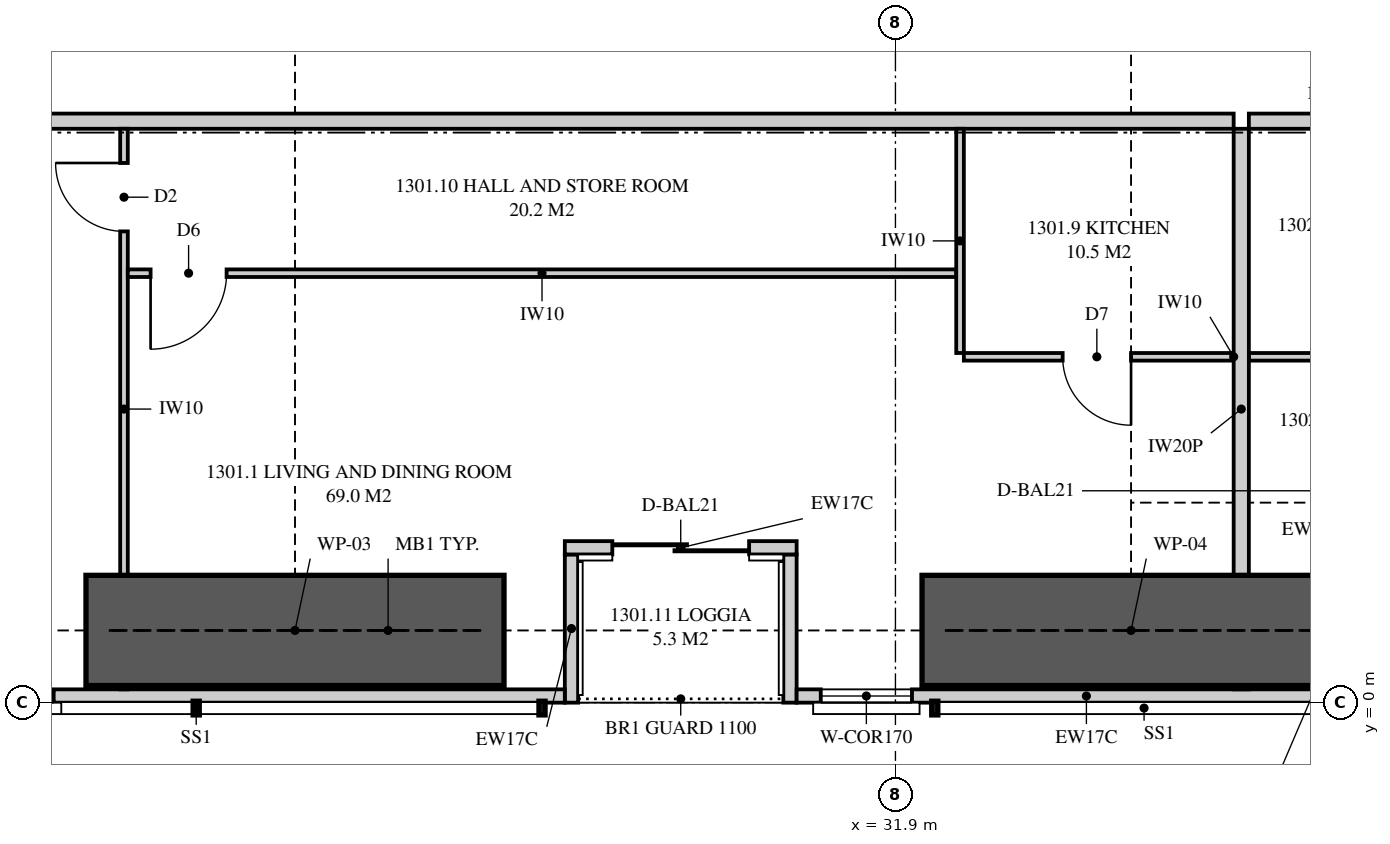
"""IFC4 building model, lengths in metres.
Left out: names, types, materials, properties, quantities, classifications, styles, units other than length and angle.
Written with IfcOpenShell. Run it as: python <this file> out.ifc"""

import sys

from ifc_helpers import new_model, si_unit, direction, frame, frame_2d, origin, place, context, subcontext, project, spatial, polyline, rectangle, outline, extrude, element, fill, save


model = new_model("IFC4")
c1 = context("Model", 3, precision=1e-05, world=origin(), true_north=direction((0.0, 1.0)))
c2 = subcontext(c1, "Body", "Model", "MODEL_VIEW")
j1 = project(units=[si_unit("LENGTHUNIT", "METRE"), si_unit("PLANEANGLEUNIT", "RADIAN")], contexts=[c1])
p1 = place(None, origin())
s1 = spatial("IfcSite", under=j1, at=p1, CompositionType="ELEMENT")
p2 = place(p1, origin())
s2 = spatial("IfcBuilding", under=s1, at=p2, CompositionType="ELEMENT")
p3 = place(p2, frame((0.0, 0.0, 51.15)))
s3 = spatial("IfcBuildingStorey", under=s2, at=p3, CompositionType="ELEMENT", Elevation=51.15)
p4 = place(p3, frame((5.051, 0.087, 0.0), z_axis=(0.0, 0.0, 1.0), x_axis=(1.0, 0.0, 0.0)))
e1 = element("IfcWall", 1, at=p4, inside=s3, PredefinedType="SOLIDWALL", context=c2, shape_type="SweptSolid", body=[
    extrude(outline(polyline([(0.0, 0.0), (22.499, 0.0), (22.499, 2.15), (7.949, 2.15), (7.949, 3.11), (7.793, 3.11), (7.793, 2.15), (7.745, 2.15), (7.745, 3.11), (0.0, 3.11), (0.0, 0.0)])), frame((0.0, 0.087, 0.0), z_axis=(0.0, -1.0, 0.0), x_axis=(1.0, 0.0, 0.0)), (0.0, 0.0, 1.0), 0.175),
])
p5 = place(p4, frame((3.234, 0.0, 0.4)))
e2 = element("IfcOpeningElement", 2, at=p5, cuts=e1, PredefinedType="OPENING", context=c2, shape_type="SweptSolid", body=[
    extrude(rectangle(XDim=1.8, YDim=1.7, at=frame_2d((0.9, 0.85))), frame((0.0, 0.097, 0.0), z_axis=(0.0, -1.0, 0.0), x_axis=(1.0, 0.0, 0.0)), (0.0, 0.0, 1.0), 0.195),
])
p6 = place(p4, frame((10.806, 0.0, 0.4)))
e3 = element("IfcOpeningElement", 3, at=p6, cuts=e1, PredefinedType="OPENING", context=c2, shape_type="SweptSolid", body=[
    extrude(rectangle(XDim=1.8, YDim=1.7, at=frame_2d((0.9, 0.85))), frame((0.0, 0.097, 0.0), z_axis=(0.0, -1.0, 0.0), x_axis=(1.0, 0.0, 0.0)), (0.0, 0.0, 1.0), 0.195),
])
p7 = place(p4, frame((13.974, 0.0, 0.4)))
e4 = element("IfcOpeningElement", 4, at=p7, cuts=e1, PredefinedType="OPENING", context=c2, shape_type="SweptSolid", body=[
    extrude(rectangle(XDim=1.8, YDim=1.7, at=frame_2d((0.9, 0.85))), frame((0.0, 0.097, 0.0), z_axis=(0.0, -1.0, 0.0), x_axis=(1.0, 0.0, 0.0)), (0.0, 0.0, 1.0), 0.195),
])
p8 = place(p3, frame((30.6, 0.087, 0.0), z_axis=(0.0, 0.0, 1.0), x_axis=(1.0, 0.0, 0.0)))
e5 = element("IfcWall", 5, at=p8, inside=s3, PredefinedType="SOLIDWALL", context=c2, shape_type="SweptSolid", body=[
    extrude(outline(polyline([(0.0, 0.0), (7.625, 0.0), (7.625, 3.11), (4.604, 3.11), (4.604, 2.15), (4.556, 2.15), (4.556, 3.11), (4.4, 3.11), (4.4, 2.15), (0.0, 2.15), (0.0, 0.0)])), frame((0.0, 0.087, 0.0), z_axis=(0.0, -1.0, 0.0), x_axis=(1.0, 0.0, 0.0)), (0.0, 0.0, 1.0), 0.175),
])
p9 = place(p8, frame((0.317, 0.0, 0.4)))
e6 = element("IfcOpeningElement", 6, at=p9, cuts=e5, PredefinedType="OPENING", context=c2, shape_type="SweptSolid", body=[
    extrude(rectangle(XDim=1.2, YDim=1.7, at=frame_2d((0.6, 0.85))), frame((0.0, 0.097, 0.0), z_axis=(0.0, -1.0, 0.0), x_axis=(1.0, 0.0, 0.0)), (0.0, 0.0, 1.0), 0.195),
])
p10 = place(p3, frame((27.55, 2.038, 0.0), z_axis=(0.0, 0.0, 1.0), x_axis=(1.0, 0.0, 0.0)))
e7 = element("IfcWall", 7, at=p10, inside=s3, PredefinedType="SOLIDWALL", context=c2, shape_type="SweptSolid", body=[
    extrude(rectangle(XDim=3.05, YDim=0.175, at=frame_2d((1.525, 0.0))), origin(), (0.0, 0.0, 1.0), 3.11),
])
p11 = place(p10, frame((0.625, 0.0, 0.0)))
e8 = element("IfcOpeningElement", 8, at=p11, cuts=e7, PredefinedType="OPENING", context=c2, shape_type="SweptSolid", body=[
    extrude(rectangle(XDim=1.8, YDim=2.1, at=frame_2d((0.9, 1.05))), frame((0.0, 0.097, 0.0), z_axis=(0.0, -1.0, 0.0), x_axis=(1.0, 0.0, 0.0)), (0.0, 0.0, 1.0), 0.195),
])
for number, where, z_axis, x_axis in (
    (9, (27.637, 0.0, 0.0), (0.0, 0.0, 1.0), (0.0, 1.0, 0.0)),
    (10, (30.512, 0.0, 0.0), (0.0, 0.0, 1.0), (0.0, 1.0, 0.0)),
):
    element("IfcWall", number, at=place(p3, frame(where, z_axis=z_axis, x_axis=x_axis)), inside=s3, PredefinedType="SOLIDWALL", context=c2, shape_type="SweptSolid", body=[
        extrude(outline(polyline([(0.0, 0.0), (1.95, 0.0), (1.95, 3.11), (1.75, 3.11), (1.75, 2.15), (0.15, 2.15), (0.15, 3.11), (0.0, 3.11), (0.0, 0.0)])), frame((0.0, 0.087, 0.0), z_axis=(0.0, -1.0, 0.0), x_axis=(1.0, 0.0, 0.0)), (0.0, 0.0, 1.0), 0.175),
    ])
p12 = place(p3, frame((36.45, 0.175, 0.0), z_axis=(0.0, 0.0, 1.0), x_axis=(0.0, 1.0, 0.0)))
e11 = element("IfcWall", 11, at=p12, inside=s3, PredefinedType="PARTITIONING", context=c2, shape_type="SweptSolid", body=[
    extrude(outline(polyline([(0.138, 3.11), (0.0, 3.11), (0.0, 0.0), (0.529, 0.0), (0.529, 0.513), (1.021, 0.513), (1.021, 0.0), (7.375, 0.0), (7.375, 3.11), (3.766, 3.11), (3.766, 2.51), (1.994, 2.51), (1.994, 2.15), (1.021, 2.15), (1.021, 1.637), (0.529, 1.637), (0.529, 2.15), (0.138, 2.15), (0.138, 3.11)])), frame((0.0, 0.1, 0.0), z_axis=(0.0, -1.0, 0.0), x_axis=(1.0, 0.0, 0.0)), (0.0, 0.0, 1.0), 0.2),
])
p13 = place(p3, frame((17.725, 7.65, 0.0), z_axis=(0.0, 0.0, 1.0), x_axis=(1.0, 0.0, 0.0)))
e12 = element("IfcWall", 12, at=p13, inside=s3, PredefinedType="PARTITIONING", context=c2, shape_type="SweptSolid", body=[
    extrude(outline(polyline([(0.0, 0.0), (18.625, 0.0), (18.625, 3.11), (17.612, 3.11), (17.612, 2.541), (16.938, 2.541), (16.938, 3.11), (6.612, 3.11), (6.612, 2.541), (5.938, 2.541), (5.938, 3.11), (0.0, 3.11), (0.0, 0.0)])), frame((0.0, 0.1, 0.0), z_axis=(0.0, -1.0, 0.0), x_axis=(1.0, 0.0, 0.0)), (0.0, 0.0, 1.0), 0.2),
])
p14 = place(p13, frame((1.0, 0.0, 0.0)))
e13 = element("IfcOpeningElement", 13, at=p14, cuts=e12, PredefinedType="OPENING", context=c2, shape_type="SweptSolid", body=[
    extrude(rectangle(XDim=1.05, YDim=2.2, at=frame_2d((0.525, 1.1))), frame((0.0, 0.11, 0.0), z_axis=(0.0, -1.0, 0.0), x_axis=(1.0, 0.0, 0.0)), (0.0, 0.0, 1.0), 0.22),
])
p15 = place(p3, frame((21.75, 0.175, 0.0), z_axis=(0.0, 0.0, 1.0), x_axis=(0.0, 1.0, 0.0)))
e14 = element("IfcWall", 14, at=p15, inside=s3, PredefinedType="PARTITIONING", context=c2, shape_type="SweptSolid", body=[
    extrude(outline(polyline([(0.0, 0.0), (7.375, 0.0), (7.375, 3.11), (1.635, 3.11), (1.635, 2.15), (0.0, 2.15), (0.0, 3.11), (0.0, 0.0)])), frame((0.0, 0.05, 0.0), z_axis=(0.0, -1.0, 0.0), x_axis=(1.0, 0.0, 0.0)), (0.0, 0.0, 1.0), 0.1),
])
p16 = place(p15, frame((6.025, 0.0, 0.0)))
e15 = element("IfcOpeningElement", 15, at=p16, cuts=e14, PredefinedType="OPENING", context=c2, shape_type="SweptSolid", body=[
    extrude(rectangle(XDim=0.9, YDim=2.1, at=frame_2d((0.45, 1.05))), frame((0.0, 0.06, 0.0), z_axis=(0.0, -1.0, 0.0), x_axis=(1.0, 0.0, 0.0)), (0.0, 0.0, 1.0), 0.12),
])
p17 = place(p3, frame((32.8, 4.55, 0.0), z_axis=(0.0, 0.0, 1.0), x_axis=(1.0, 0.0, 0.0)))
e16 = element("IfcWall", 16, at=p17, inside=s3, PredefinedType="PARTITIONING", context=c2, shape_type="SweptSolid", body=[
    extrude(outline(polyline([(0.0, 0.0), (3.55, 0.0), (3.55, 3.11), (2.487, 3.11), (2.487, 2.541), (1.913, 2.541), (1.913, 3.11), (0.0, 3.11), (0.0, 0.0)])), frame((0.0, 0.05, 0.0), z_axis=(0.0, -1.0, 0.0), x_axis=(1.0, 0.0, 0.0)), (0.0, 0.0, 1.0), 0.1),
])
p18 = place(p17, frame((1.3, 0.0, 0.0)))
e17 = element("IfcOpeningElement", 17, at=p18, cuts=e16, PredefinedType="OPENING", context=c2, shape_type="SweptSolid", body=[
    extrude(rectangle(XDim=0.9, YDim=2.1, at=frame_2d((0.45, 1.05))), frame((0.0, 0.06, 0.0), z_axis=(0.0, -1.0, 0.0), x_axis=(1.0, 0.0, 0.0)), (0.0, 0.0, 1.0), 0.12),
])
p19 = place(p3, frame((32.75, 4.6, 0.0), z_axis=(0.0, 0.0, 1.0), x_axis=(0.0, 1.0, 0.0)))
e18 = element("IfcWall", 18, at=p19, inside=s3, PredefinedType="PARTITIONING", context=c2, shape_type="SweptSolid", body=[
    extrude(rectangle(XDim=2.95, YDim=0.1, at=frame_2d((1.475, 0.0))), origin(), (0.0, 0.0, 1.0), 3.11),
])
p20 = place(p3, frame((21.8, 5.65, 0.0), z_axis=(0.0, 0.0, 1.0), x_axis=(1.0, 0.0, 0.0)))
e19 = element("IfcWall", 19, at=p20, inside=s3, PredefinedType="PARTITIONING", context=c2, shape_type="SweptSolid", body=[
    extrude(outline(polyline([(0.0, 0.0), (10.9, 0.0), (10.9, 3.11), (2.487, 3.11), (2.487, 2.541), (1.913, 2.541), (1.913, 3.11), (0.0, 3.11), (0.0, 0.0)])), frame((0.0, 0.05, 0.0), z_axis=(0.0, -1.0, 0.0), x_axis=(1.0, 0.0, 0.0)), (0.0, 0.0, 1.0), 0.1),
])
p21 = place(p20, frame((0.3, 0.0, 0.0)))
e20 = element("IfcOpeningElement", 20, at=p21, cuts=e19, PredefinedType="OPENING", context=c2, shape_type="SweptSolid", body=[
    extrude(rectangle(XDim=1.0, YDim=2.1, at=frame_2d((0.5, 1.05))), frame((0.0, 0.06, 0.0), z_axis=(0.0, -1.0, 0.0), x_axis=(1.0, 0.0, 0.0)), (0.0, 0.0, 1.0), 0.12),
])
p22 = place(p3, frame((36.55, 7.65, 0.0), z_axis=(0.0, 0.0, 1.0), x_axis=(1.0, 0.0, 0.0)))
e21 = element("IfcWall", 21, at=p22, inside=s3, PredefinedType="PARTITIONING", context=c2, shape_type="SweptSolid", body=[
    extrude(outline(polyline([(0.0, 0.0), (9.45, 0.0), (9.45, 3.11), (8.554, 3.11), (8.554, 2.15), (6.71, 2.15), (6.71, 3.11), (0.0, 3.11), (0.0, 0.0)])), frame((0.0, 0.1, 0.0), z_axis=(0.0, -1.0, 0.0), x_axis=(1.0, 0.0, 0.0)), (0.0, 0.0, 1.0), 0.2),
])
p23 = place(p22, frame((1.45, 0.0, 0.0)))
e22 = element("IfcOpeningElement", 22, at=p23, cuts=e21, PredefinedType="OPENING", context=c2, shape_type="SweptSolid", body=[
    extrude(rectangle(XDim=1.05, YDim=2.2, at=frame_2d((0.525, 1.1))), frame((0.0, 0.11, 0.0), z_axis=(0.0, -1.0, 0.0), x_axis=(1.0, 0.0, 0.0)), (0.0, 0.0, 1.0), 0.22),
])
p24 = place(p3, frame((36.55, 4.55, 0.0), z_axis=(0.0, 0.0, 1.0), x_axis=(1.0, 0.0, 0.0)))
e23 = element("IfcWall", 23, at=p24, inside=s3, PredefinedType="PARTITIONING", context=c2, shape_type="SweptSolid", body=[
    extrude(rectangle(XDim=3.55, YDim=0.1, at=frame_2d((1.775, 0.0))), origin(), (0.0, 0.0, 1.0), 3.11),
])
p25 = place(p24, frame((1.35, 0.0, 0.0)))
e24 = element("IfcOpeningElement", 24, at=p25, cuts=e23, PredefinedType="OPENING", context=c2, shape_type="SweptSolid", body=[
    extrude(rectangle(XDim=0.9, YDim=2.1, at=frame_2d((0.45, 1.05))), frame((0.0, 0.06, 0.0), z_axis=(0.0, -1.0, 0.0), x_axis=(1.0, 0.0, 0.0)), (0.0, 0.0, 1.0), 0.12),
])
for number, where, z_axis, x_axis in (
    (25, (21.25, 0.95, 0.0), (0.0, 0.0, 1.0), (1.0, 0.0, 0.0)),
    (26, (32.25, 0.95, 0.0), (0.0, 0.0, 1.0), (1.0, 0.0, 0.0)),
):
    element("IfcWall", number, at=place(p3, frame(where, z_axis=z_axis, x_axis=x_axis)), inside=s3, PredefinedType="SHEAR", context=c2, shape_type="SweptSolid", body=[
        extrude(rectangle(XDim=5.5, YDim=1.45, at=frame_2d((2.75, 0.0))), origin(), (0.0, 0.0, 1.0), 3.35),
    ])
p26 = place(p7, origin())
e27 = element("IfcWindow", 27, at=p26, inside=s3, PartitioningType="SINGLE_PANEL", PredefinedType="WINDOW", context=c2, shape_type="SweptSolid", body=[
    extrude(rectangle(XDim=1.8, YDim=1.7, at=frame_2d((0.9, 0.85))), frame((0.0, 0.03, 0.0), z_axis=(0.0, -1.0, 0.0), x_axis=(1.0, 0.0, 0.0)), (0.0, 0.0, 1.0), 0.06),
])
fill(e4, e27)
p27 = place(p11, origin())
e28 = element("IfcDoor", 28, at=p27, inside=s3, OperationType="SLIDING_TO_LEFT", PredefinedType="DOOR", context=c2, shape_type="SweptSolid", body=[
    extrude(rectangle(XDim=1.8, YDim=2.1, at=frame_2d((0.9, 1.05))), frame((0.0, 0.025, 0.0), z_axis=(0.0, -1.0, 0.0), x_axis=(1.0, 0.0, 0.0)), (0.0, 0.0, 1.0), 0.05),
])
fill(e8, e28)
p28 = place(p9, origin())
e29 = element("IfcWindow", 29, at=p28, inside=s3, PartitioningType="SINGLE_PANEL", PredefinedType="WINDOW", context=c2, shape_type="SweptSolid", body=[
    extrude(rectangle(XDim=1.2, YDim=1.7, at=frame_2d((0.6, 0.85))), frame((0.0, 0.03, 0.0), z_axis=(0.0, -1.0, 0.0), x_axis=(1.0, 0.0, 0.0)), (0.0, 0.0, 1.0), 0.06),
])
fill(e6, e29)
p29 = place(p16, origin())
e30 = element("IfcDoor", 30, at=p29, inside=s3, OperationType="SINGLE_SWING_RIGHT", PredefinedType="DOOR", context=c2, shape_type="SweptSolid", body=[
    extrude(rectangle(XDim=0.9, YDim=2.1, at=frame_2d((0.45, 1.05))), frame((0.0, 0.025, 0.0), z_axis=(0.0, -1.0, 0.0), x_axis=(1.0, 0.0, 0.0)), (0.0, 0.0, 1.0), 0.05),
])
fill(e15, e30)
p30 = place(p18, frame((0.9, 0.0, 0.0), z_axis=(0.0, 0.0, 1.0), x_axis=(-1.0, 0.0, 0.0)))
e31 = element("IfcDoor", 31, at=p30, inside=s3, OperationType="SINGLE_SWING_LEFT", PredefinedType="DOOR", context=c2, shape_type="SweptSolid", body=[
    extrude(rectangle(XDim=0.9, YDim=2.1, at=frame_2d((0.45, 1.05))), frame((0.0, 0.025, 0.0), z_axis=(0.0, -1.0, 0.0), x_axis=(1.0, 0.0, 0.0)), (0.0, 0.0, 1.0), 0.05),
])
fill(e17, e31)
p31 = place(p21, frame((1.0, 0.0, 0.0), z_axis=(0.0, 0.0, 1.0), x_axis=(-1.0, 0.0, 0.0)))
e32 = element("IfcDoor", 32, at=p31, inside=s3, OperationType="SINGLE_SWING_RIGHT", PredefinedType="DOOR", context=c2, shape_type="SweptSolid", body=[
    extrude(rectangle(XDim=1.0, YDim=2.1, at=frame_2d((0.5, 1.05))), frame((0.0, 0.025, 0.0), z_axis=(0.0, -1.0, 0.0), x_axis=(1.0, 0.0, 0.0)), (0.0, 0.0, 1.0), 0.05),
])
fill(e20, e32)
save(model, sys.argv[1])
